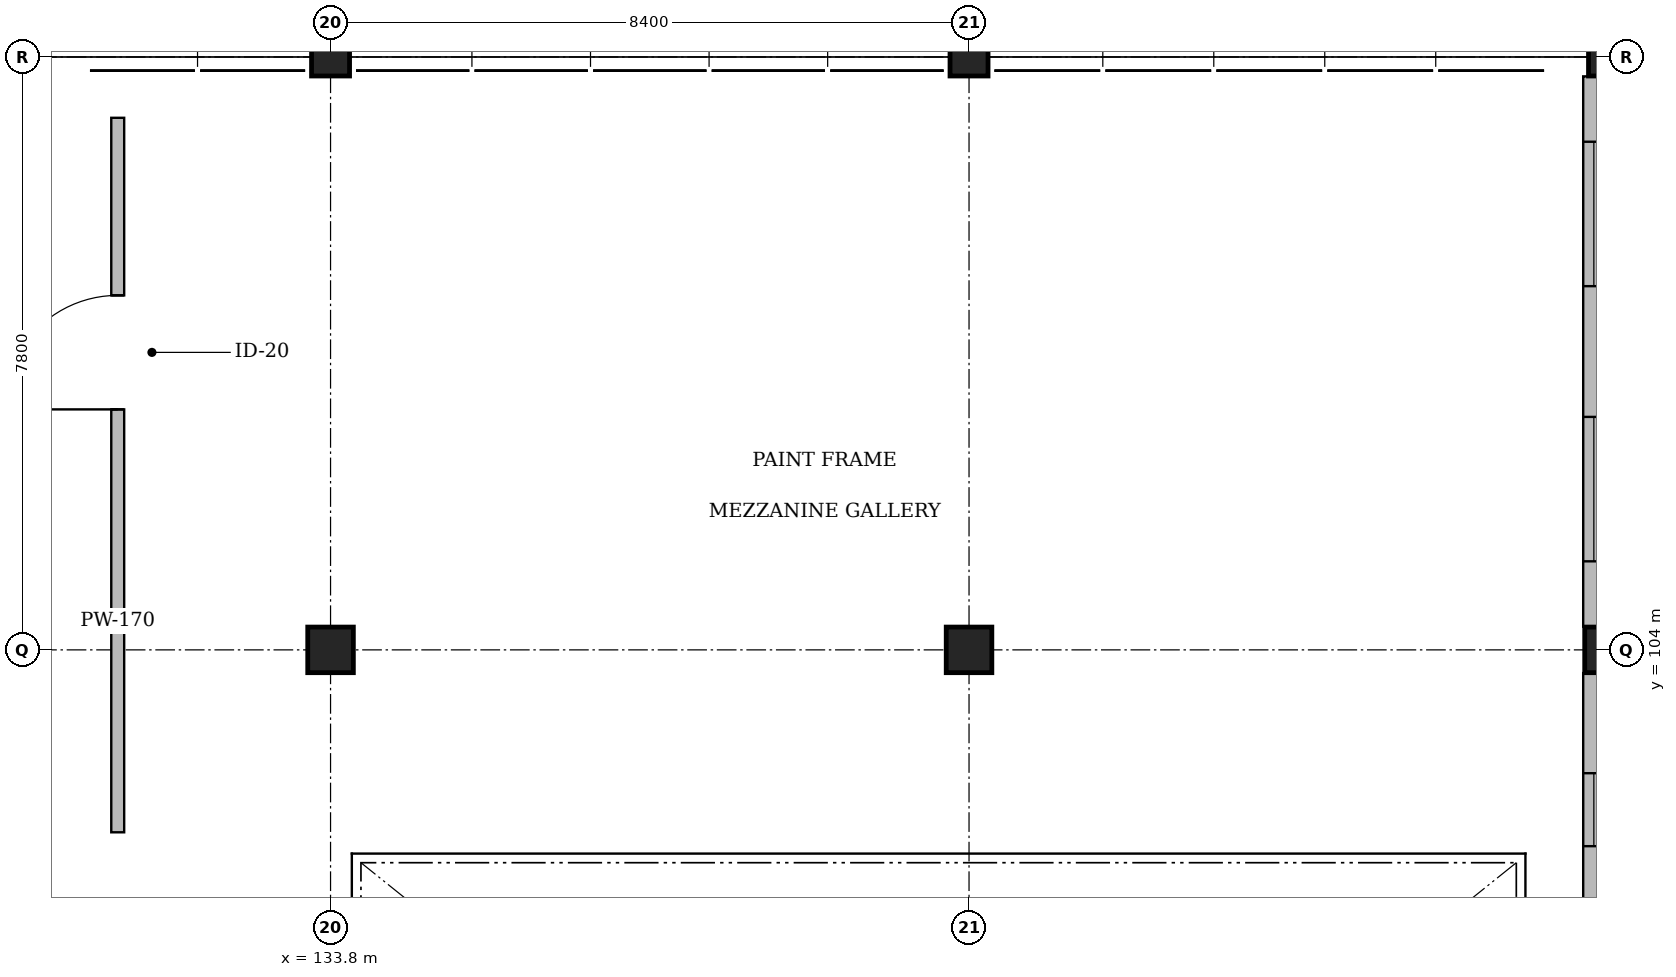
"""IFC4 building model, lengths in metres.
Left out: names, types, materials, properties, quantities, classifications, styles, units other than length and angle.
Written with IfcOpenShell. Run it as: python <this file> out.ifc"""

import sys

from ifc_helpers import new_model, si_unit, direction, frame, frame_2d, origin, origin_2d, place, context, subcontext, project, spatial, rectangle, extrude, element, fill, save


model = new_model("IFC4")
c1 = context("Model", 3, precision=1e-05, world=origin(), true_north=direction((0.0, 1.0)))
c2 = subcontext(c1, "Body", "Model", "MODEL_VIEW")
j1 = project(units=[si_unit("LENGTHUNIT", "METRE"), si_unit("PLANEANGLEUNIT", "RADIAN")], contexts=[c1])
p1 = place(None, origin())
s1 = spatial("IfcSite", under=j1, at=p1, CompositionType="ELEMENT")
p2 = place(p1, origin())
s2 = spatial("IfcBuilding", under=s1, at=p2, CompositionType="ELEMENT")
p3 = place(p2, frame((0.0, 0.0, 4.8)))
s3 = spatial("IfcBuildingStorey", under=s2, at=p3, CompositionType="ELEMENT", Elevation=4.8)
p4 = place(p3, frame((133.8, 104.0, 0.0), z_axis=(0.0, 0.0, 1.0), x_axis=(1.0, 0.0, 0.0)))
e1 = element("IfcColumn", 1, at=p4, inside=s3, PredefinedType="COLUMN", context=c2, shape_type="SweptSolid", body=[
    extrude(rectangle(XDim=0.6, YDim=0.6, at=origin_2d()), origin(), (0.0, 0.0, 1.0), 4.2),
])
p5 = place(p3, frame((133.8, 111.8, 0.0), z_axis=(0.0, 0.0, 1.0), x_axis=(1.0, 0.0, 0.0)))
e2 = element("IfcColumn", 2, at=p5, inside=s3, PredefinedType="COLUMN", context=c2, shape_type="SweptSolid", body=[
    extrude(rectangle(XDim=0.5, YDim=0.5, at=origin_2d()), origin(), (0.0, 0.0, 1.0), 4.2),
])
p6 = place(p3, frame((142.2, 104.0, 0.0), z_axis=(0.0, 0.0, 1.0), x_axis=(1.0, 0.0, 0.0)))
e3 = element("IfcColumn", 3, at=p6, inside=s3, PredefinedType="COLUMN", context=c2, shape_type="SweptSolid", body=[
    extrude(rectangle(XDim=0.6, YDim=0.6, at=origin_2d()), origin(), (0.0, 0.0, 1.0), 4.2),
])
p7 = place(p3, frame((142.2, 111.8, 0.0), z_axis=(0.0, 0.0, 1.0), x_axis=(1.0, 0.0, 0.0)))
e4 = element("IfcColumn", 4, at=p7, inside=s3, PredefinedType="COLUMN", context=c2, shape_type="SweptSolid", body=[
    extrude(rectangle(XDim=0.5, YDim=0.5, at=origin_2d()), origin(), (0.0, 0.0, 1.0), 4.2),
])
p8 = place(p3, frame((150.6, 104.0, 0.0), z_axis=(0.0, 0.0, 1.0), x_axis=(1.0, 0.0, 0.0)))
e5 = element("IfcColumn", 5, at=p8, inside=s3, PredefinedType="COLUMN", context=c2, shape_type="SweptSolid", body=[
    extrude(rectangle(XDim=0.6, YDim=0.6, at=origin_2d()), origin(), (0.0, 0.0, 1.0), 4.2),
])
p9 = place(p3, frame((150.6, 111.8, 0.0), z_axis=(0.0, 0.0, 1.0), x_axis=(1.0, 0.0, 0.0)))
e6 = element("IfcColumn", 6, at=p9, inside=s3, PredefinedType="COLUMN", context=c2, shape_type="SweptSolid", body=[
    extrude(rectangle(XDim=0.5, YDim=0.5, at=origin_2d()), origin(), (0.0, 0.0, 1.0), 4.2),
])
p10 = place(p3, frame((150.42, 96.505, 0.0), z_axis=(0.0, 0.0, 1.0), x_axis=(0.0, 1.0, 0.0)))
e7 = element("IfcWall", 7, at=p10, inside=s3, PredefinedType="SOLIDWALL", context=c2, shape_type="SweptSolid", body=[
    extrude(rectangle(XDim=7.19, YDim=0.28, at=frame_2d((3.595, 0.0))), origin(), (0.0, 0.0, 1.0), 3.653),
])
p11 = place(p10, frame((1.317, 0.0, 0.95)))
e8 = element("IfcOpeningElement", 8, at=p11, cuts=e7, PredefinedType="OPENING", context=c2, shape_type="SweptSolid", body=[
    extrude(rectangle(XDim=0.96, YDim=1.55, at=frame_2d((0.48, 0.775))), frame((0.0, 0.16, 0.0), z_axis=(0.0, -1.0, 0.0), x_axis=(1.0, 0.0, 0.0)), (0.0, 0.0, 1.0), 0.32),
])
p12 = place(p10, frame((4.913, 0.0, 0.95)))
e9 = element("IfcOpeningElement", 9, at=p12, cuts=e7, PredefinedType="OPENING", context=c2, shape_type="SweptSolid", body=[
    extrude(rectangle(XDim=0.96, YDim=1.55, at=frame_2d((0.48, 0.775))), frame((0.0, 0.16, 0.0), z_axis=(0.0, -1.0, 0.0), x_axis=(1.0, 0.0, 0.0)), (0.0, 0.0, 1.0), 0.32),
])
p13 = place(p3, frame((150.42, 104.305, 0.0), z_axis=(0.0, 0.0, 1.0), x_axis=(0.0, 1.0, 0.0)))
e10 = element("IfcWall", 10, at=p13, inside=s3, PredefinedType="SOLIDWALL", context=c2, shape_type="SweptSolid", body=[
    extrude(rectangle(XDim=7.24, YDim=0.28, at=frame_2d((3.62, 0.0))), origin(), (0.0, 0.0, 1.0), 3.653),
])
p14 = place(p13, frame((0.86, 0.0, 0.95)))
e11 = element("IfcOpeningElement", 11, at=p14, cuts=e10, PredefinedType="OPENING", context=c2, shape_type="SweptSolid", body=[
    extrude(rectangle(XDim=1.9, YDim=1.6, at=frame_2d((0.95, 0.8))), frame((0.0, 0.16, 0.0), z_axis=(0.0, -1.0, 0.0), x_axis=(1.0, 0.0, 0.0)), (0.0, 0.0, 1.0), 0.32),
])
p15 = place(p13, frame((4.48, 0.0, 0.95)))
e12 = element("IfcOpeningElement", 12, at=p15, cuts=e10, PredefinedType="OPENING", context=c2, shape_type="SweptSolid", body=[
    extrude(rectangle(XDim=1.9, YDim=1.6, at=frame_2d((0.95, 0.8))), frame((0.0, 0.16, 0.0), z_axis=(0.0, -1.0, 0.0), x_axis=(1.0, 0.0, 0.0)), (0.0, 0.0, 1.0), 0.32),
])
p16 = place(p3, frame((131.0, 101.6, 0.0), z_axis=(0.0, 0.0, 1.0), x_axis=(0.0, 1.0, 0.0)))
e13 = element("IfcWall", 13, at=p16, inside=s3, PredefinedType="PARTITIONING", context=c2, shape_type="SweptSolid", body=[
    extrude(rectangle(XDim=9.4, YDim=0.17, at=frame_2d((4.7, 0.0))), origin(), (0.0, 0.0, 1.0), 3.94),
])
p17 = place(p16, frame((5.564, 0.0, 0.0)))
e14 = element("IfcOpeningElement", 14, at=p17, cuts=e13, PredefinedType="OPENING", context=c2, shape_type="SweptSolid", body=[
    extrude(rectangle(XDim=1.5, YDim=2.25, at=frame_2d((0.75, 1.125))), frame((0.0, 0.105, 0.0), z_axis=(0.0, -1.0, 0.0), x_axis=(1.0, 0.0, 0.0)), (0.0, 0.0, 1.0), 0.21),
])
p18 = place(p12, origin())
e15 = element("IfcWindow", 15, at=p18, inside=s3, PartitioningType="SINGLE_PANEL", PredefinedType="WINDOW", context=c2, shape_type="SweptSolid", body=[
    extrude(rectangle(XDim=0.96, YDim=1.55, at=frame_2d((0.48, 0.775))), frame((0.0, 0.03, 0.0), z_axis=(0.0, -1.0, 0.0), x_axis=(1.0, 0.0, 0.0)), (0.0, 0.0, 1.0), 0.06),
])
fill(e9, e15)
p19 = place(p14, origin())
e16 = element("IfcWindow", 16, at=p19, inside=s3, PartitioningType="SINGLE_PANEL", PredefinedType="WINDOW", context=c2, shape_type="SweptSolid", body=[
    extrude(rectangle(XDim=1.9, YDim=1.6, at=frame_2d((0.95, 0.8))), frame((0.0, 0.03, 0.0), z_axis=(0.0, -1.0, 0.0), x_axis=(1.0, 0.0, 0.0)), (0.0, 0.0, 1.0), 0.06),
])
fill(e11, e16)
p20 = place(p15, origin())
e17 = element("IfcWindow", 17, at=p20, inside=s3, PartitioningType="SINGLE_PANEL", PredefinedType="WINDOW", context=c2, shape_type="SweptSolid", body=[
    extrude(rectangle(XDim=1.9, YDim=1.6, at=frame_2d((0.95, 0.8))), frame((0.0, 0.03, 0.0), z_axis=(0.0, -1.0, 0.0), x_axis=(1.0, 0.0, 0.0)), (0.0, 0.0, 1.0), 0.06),
])
fill(e12, e17)
p21 = place(p17, origin())
e18 = element("IfcDoor", 18, at=p21, inside=s3, OperationType="DOUBLE_DOOR_SINGLE_SWING", PredefinedType="DOOR", context=c2, shape_type="SweptSolid", body=[
    extrude(rectangle(XDim=1.5, YDim=2.25, at=frame_2d((0.75, 1.125))), frame((0.0, 0.025, 0.0), z_axis=(0.0, -1.0, 0.0), x_axis=(1.0, 0.0, 0.0)), (0.0, 0.0, 1.0), 0.05),
])
fill(e14, e18)
save(model, sys.argv[1])
